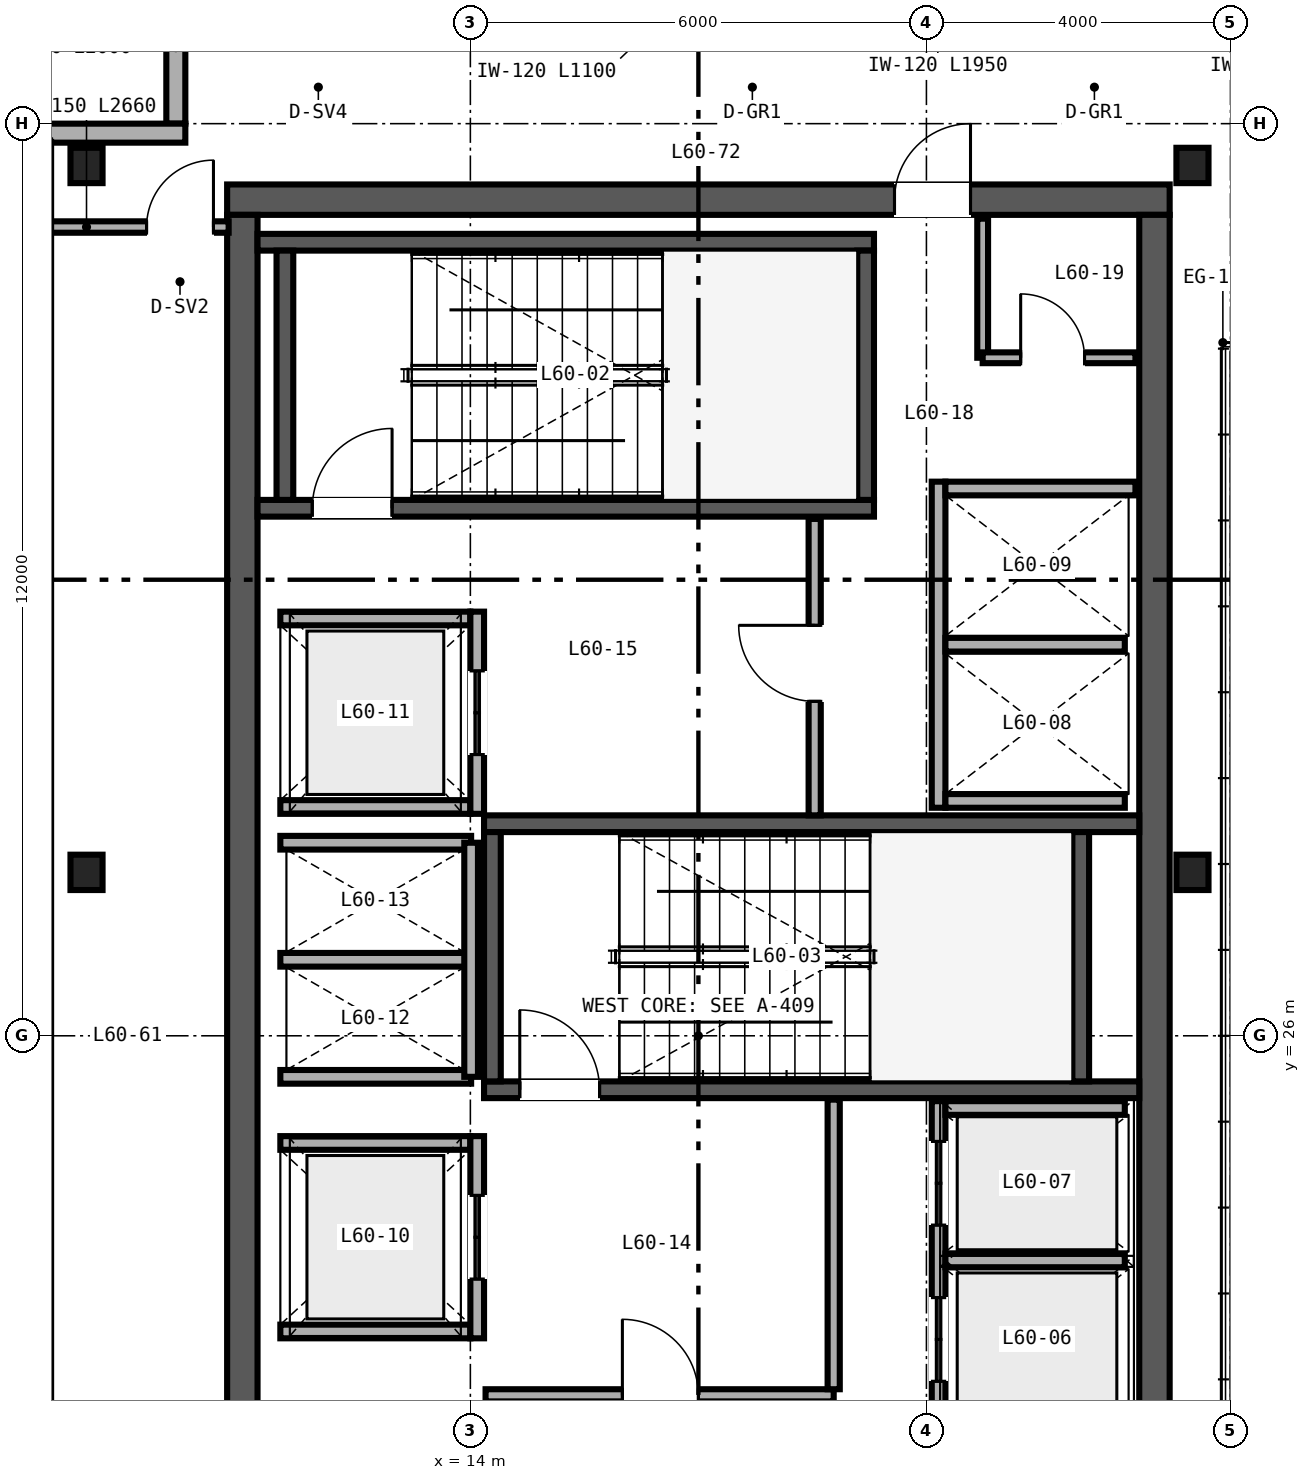
"""IFC4 building model, lengths in metres.
Left out: names, types, materials, properties, quantities, classifications, styles, units other than length and angle.
Written with IfcOpenShell. Run it as: python <this file> out.ifc"""

import sys

from ifc_helpers import new_model, si_unit, direction, frame, frame_2d, origin, origin_2d, place, context, subcontext, project, spatial, rectangle, i_section, extrude, source, transform, mapped, element, fill, save


model = new_model("IFC4")
c1 = context("Model", 3, precision=1e-05, world=origin(), true_north=direction((0.0, 1.0)))
c2 = subcontext(c1, "Body", "Model", "MODEL_VIEW")
j1 = project(units=[si_unit("LENGTHUNIT", "METRE"), si_unit("PLANEANGLEUNIT", "RADIAN")], contexts=[c1])
p1 = place(None, origin())
s1 = spatial("IfcSite", under=j1, at=p1, CompositionType="ELEMENT")
p2 = place(p1, origin())
s2 = spatial("IfcBuilding", under=s1, at=p2, CompositionType="ELEMENT")
p3 = place(p2, frame((0.0, 0.0, 240.0)))
s3 = spatial("IfcBuildingStorey", under=s2, at=p3, CompositionType="ELEMENT", Elevation=240.0)
p4 = place(p3, frame((10.8, 37.0, 0.0), z_axis=(0.0, 0.0, 1.0), x_axis=(1.0, 0.0, 0.0)))
e1 = element("IfcWall", 1, at=p4, inside=s3, PredefinedType="SHEAR", context=c2, shape_type="SweptSolid", body=[
    extrude(rectangle(XDim=12.4, YDim=0.4, at=frame_2d((6.2, 0.0))), origin(), (0.0, 0.0, 1.0), 3.38),
])
p5 = place(p4, frame((8.78, 0.0, 0.0)))
e2 = element("IfcOpeningElement", 2, at=p5, cuts=e1, PredefinedType="OPENING", context=c2, shape_type="SweptSolid", body=[
    extrude(rectangle(XDim=1.0, YDim=2.15, at=frame_2d((0.5, 1.075))), frame((0.0, 0.21, 0.0), z_axis=(0.0, -1.0, 0.0), x_axis=(1.0, 0.0, 0.0)), (0.0, 0.0, 1.0), 0.42),
])
for number, where, z_axis, x_axis in (
    (3, (11.0, 15.2, 0.0), (0.0, 0.0, 1.0), (0.0, 1.0, 0.0)),
    (4, (23.0, 15.2, 0.0), (0.0, 0.0, 1.0), (0.0, 1.0, 0.0)),
):
    element("IfcWall", number, at=place(p3, frame(where, z_axis=z_axis, x_axis=x_axis)), inside=s3, PredefinedType="SHEAR", context=c2, shape_type="SweptSolid", body=[
        extrude(rectangle(XDim=21.6, YDim=0.4, at=frame_2d((10.8, 0.0))), origin(), (0.0, 0.0, 1.0), 3.38),
    ])
p6 = place(p3, frame((11.2, 32.94, 0.0), z_axis=(0.0, 0.0, 1.0), x_axis=(1.0, 0.0, 0.0)))
e5 = element("IfcWall", 5, at=p6, inside=s3, PredefinedType="SHEAR", context=c2, shape_type="SweptSolid", body=[
    extrude(rectangle(XDim=8.11, YDim=0.22, at=frame_2d((4.055, 0.0))), origin(), (0.0, 0.0, 1.0), 3.4),
])
p7 = place(p6, frame((0.72, 0.0, 0.0)))
e6 = element("IfcOpeningElement", 6, at=p7, cuts=e5, PredefinedType="OPENING", context=c2, shape_type="SweptSolid", body=[
    extrude(rectangle(XDim=1.05, YDim=2.15, at=frame_2d((0.525, 1.075))), frame((0.0, 0.12, 0.0), z_axis=(0.0, -1.0, 0.0), x_axis=(1.0, 0.0, 0.0)), (0.0, 0.0, 1.0), 0.24),
])
p8 = place(p3, frame((11.2, 36.44, 0.0), z_axis=(0.0, 0.0, 1.0), x_axis=(1.0, 0.0, 0.0)))
e7 = element("IfcWall", 7, at=p8, inside=s3, PredefinedType="SHEAR", context=c2, shape_type="SweptSolid", body=[
    extrude(rectangle(XDim=8.11, YDim=0.22, at=frame_2d((4.055, 0.0))), origin(), (0.0, 0.0, 1.0), 3.4),
])
for number, where, z_axis, x_axis in (
    (8, (11.56, 33.05, 0.0), (0.0, 0.0, 1.0), (0.0, 1.0, 0.0)),
    (9, (19.2, 33.05, 0.0), (0.0, 0.0, 1.0), (0.0, 1.0, 0.0)),
):
    element("IfcWall", number, at=place(p3, frame(where, z_axis=z_axis, x_axis=x_axis)), inside=s3, PredefinedType="SHEAR", context=c2, shape_type="SweptSolid", body=[
        extrude(rectangle(XDim=3.28, YDim=0.22, at=frame_2d((1.64, 0.0))), origin(), (0.0, 0.0, 1.0), 3.4),
    ])
p9 = place(p3, frame((14.18, 25.29, 0.0), z_axis=(0.0, 0.0, 1.0), x_axis=(1.0, 0.0, 0.0)))
e10 = element("IfcWall", 10, at=p9, inside=s3, PredefinedType="SHEAR", context=c2, shape_type="SweptSolid", body=[
    extrude(rectangle(XDim=8.62, YDim=0.22, at=frame_2d((4.31, 0.0))), origin(), (0.0, 0.0, 1.0), 3.4),
])
p10 = place(p9, frame((0.47, 0.0, 0.0)))
e11 = element("IfcOpeningElement", 11, at=p10, cuts=e10, PredefinedType="OPENING", context=c2, shape_type="SweptSolid", body=[
    extrude(rectangle(XDim=1.05, YDim=2.15, at=frame_2d((0.525, 1.075))), frame((0.0, 0.12, 0.0), z_axis=(0.0, -1.0, 0.0), x_axis=(1.0, 0.0, 0.0)), (0.0, 0.0, 1.0), 0.24),
])
p11 = place(p3, frame((14.18, 28.79, 0.0), z_axis=(0.0, 0.0, 1.0), x_axis=(1.0, 0.0, 0.0)))
e12 = element("IfcWall", 12, at=p11, inside=s3, PredefinedType="SHEAR", context=c2, shape_type="SweptSolid", body=[
    extrude(rectangle(XDim=8.62, YDim=0.22, at=frame_2d((4.31, 0.0))), origin(), (0.0, 0.0, 1.0), 3.4),
])
for number, where, z_axis, x_axis in (
    (13, (14.29, 25.4, 0.0), (0.0, 0.0, 1.0), (0.0, 1.0, 0.0)),
    (14, (22.03, 25.4, 0.0), (0.0, 0.0, 1.0), (0.0, 1.0, 0.0)),
):
    element("IfcWall", number, at=place(p3, frame(where, z_axis=z_axis, x_axis=x_axis)), inside=s3, PredefinedType="SHEAR", context=c2, shape_type="SweptSolid", body=[
        extrude(rectangle(XDim=3.28, YDim=0.22, at=frame_2d((1.64, 0.0))), origin(), (0.0, 0.0, 1.0), 3.4),
    ])
m1 = source(origin(), c2, "Body", "SweptSolid", [
    extrude(i_section(OverallWidth=0.422, OverallDepth=0.465, WebThickness=0.045, FlangeThickness=0.073, FilletRadius=0.025, at=origin_2d()), origin(), (0.0, 0.0, 1.0), 3.38),
])
for number, where, z_axis, x_axis in (
    (15, (8.95, 28.15, 0.0), (0.0, 0.0, 1.0), (1.0, 0.0, 0.0)),
    (16, (23.5, 28.15, 0.0), (0.0, 0.0, 1.0), (1.0, 0.0, 0.0)),
    (17, (8.95, 37.45, 0.0), (0.0, 0.0, 1.0), (1.0, 0.0, 0.0)),
    (18, (23.5, 37.45, 0.0), (0.0, 0.0, 1.0), (1.0, 0.0, 0.0)),
):
    element("IfcColumn", number, at=place(p3, frame(where, z_axis=z_axis, x_axis=x_axis)), inside=s3, PredefinedType="COLUMN", context=c2, shape_type="MappedRepresentation", body=[
        mapped(m1, transform((0.0, 0.0, 0.0), scale=1.0)),
    ])
p12 = place(p3, frame((10.125, 40.0, 0.0), z_axis=(0.0, 0.0, 1.0), x_axis=(0.0, -1.0, 0.0)))
e19 = element("IfcWall", 19, at=p12, inside=s3, PredefinedType="SOLIDWALL", context=c2, shape_type="SweptSolid", body=[
    extrude(rectangle(XDim=2.0, YDim=0.25, at=frame_2d((1.0, 0.0))), origin(), (0.0, 0.0, 1.0), 3.38),
])
p13 = place(p3, frame((10.25, 37.875, 0.0), z_axis=(0.0, 0.0, 1.0), x_axis=(-1.0, 0.0, 0.0)))
e20 = element("IfcWall", 20, at=p13, inside=s3, PredefinedType="SOLIDWALL", context=c2, shape_type="SweptSolid", body=[
    extrude(rectangle(XDim=2.25, YDim=0.25, at=frame_2d((1.125, 0.0))), origin(), (0.0, 0.0, 1.0), 3.38),
])
p14 = place(p3, frame((20.16, 18.82, 0.0), z_axis=(0.0, 0.0, 1.0), x_axis=(0.0, 1.0, 0.0)))
e21 = element("IfcWall", 21, at=p14, inside=s3, PredefinedType="SOLIDWALL", context=c2, shape_type="SweptSolid", body=[
    extrude(rectangle(XDim=6.32, YDim=0.18, at=frame_2d((3.16, 0.0))), origin(), (0.0, 0.0, 1.0), 2.48),
])
p15 = place(p14, frame((0.555, 0.0, 0.0)))
e22 = element("IfcOpeningElement", 22, at=p15, cuts=e21, PredefinedType="OPENING", context=c2, shape_type="SweptSolid", body=[
    extrude(rectangle(XDim=1.1, YDim=2.2, at=frame_2d((0.55, 1.1))), frame((0.0, 0.1, 0.0), z_axis=(0.0, -1.0, 0.0), x_axis=(1.0, 0.0, 0.0)), (0.0, 0.0, 1.0), 0.2),
])
p16 = place(p14, frame((2.635, 0.0, 0.0)))
e23 = element("IfcOpeningElement", 23, at=p16, cuts=e21, PredefinedType="OPENING", context=c2, shape_type="SweptSolid", body=[
    extrude(rectangle(XDim=1.1, YDim=2.2, at=frame_2d((0.55, 1.1))), frame((0.0, 0.1, 0.0), z_axis=(0.0, -1.0, 0.0), x_axis=(1.0, 0.0, 0.0)), (0.0, 0.0, 1.0), 0.2),
])
p17 = place(p14, frame((4.69, 0.0, 0.0)))
e24 = element("IfcOpeningElement", 24, at=p17, cuts=e21, PredefinedType="OPENING", context=c2, shape_type="SweptSolid", body=[
    extrude(rectangle(XDim=1.1, YDim=2.2, at=frame_2d((0.55, 1.1))), frame((0.0, 0.1, 0.0), z_axis=(0.0, -1.0, 0.0), x_axis=(1.0, 0.0, 0.0)), (0.0, 0.0, 1.0), 0.2),
])
for number, where, z_axis, x_axis in (
    (25, (20.25, 25.05, 0.0), (0.0, 0.0, 1.0), (1.0, 0.0, 0.0)),
    (26, (20.25, 23.045, 0.0), (0.0, 0.0, 1.0), (1.0, 0.0, 0.0)),
):
    element("IfcWall", number, at=place(p3, frame(where, z_axis=z_axis, x_axis=x_axis)), inside=s3, PredefinedType="SOLIDWALL", context=c2, shape_type="SweptSolid", body=[
        extrude(rectangle(XDim=2.36, YDim=0.18, at=frame_2d((1.18, 0.0))), origin(), (0.0, 0.0, 1.0), 3.38),
    ])
p18 = place(p3, frame((20.16, 29.0, 0.0), z_axis=(0.0, 0.0, 1.0), x_axis=(0.0, 1.0, 0.0)))
e27 = element("IfcWall", 27, at=p18, inside=s3, PredefinedType="SOLIDWALL", context=c2, shape_type="SweptSolid", body=[
    extrude(rectangle(XDim=4.29, YDim=0.18, at=frame_2d((2.145, 0.0))), origin(), (0.0, 0.0, 1.0), 3.38),
])
p19 = place(p3, frame((20.25, 29.09, 0.0), z_axis=(0.0, 0.0, 1.0), x_axis=(1.0, 0.0, 0.0)))
e28 = element("IfcWall", 28, at=p19, inside=s3, PredefinedType="SOLIDWALL", context=c2, shape_type="SweptSolid", body=[
    extrude(rectangle(XDim=2.36, YDim=0.18, at=frame_2d((1.18, 0.0))), origin(), (0.0, 0.0, 1.0), 3.38),
])
p20 = place(p3, frame((20.25, 33.2, 0.0), z_axis=(0.0, 0.0, 1.0), x_axis=(1.0, 0.0, 0.0)))
e29 = element("IfcWall", 29, at=p20, inside=s3, PredefinedType="SOLIDWALL", context=c2, shape_type="SweptSolid", body=[
    extrude(rectangle(XDim=2.5, YDim=0.18, at=frame_2d((1.25, 0.0))), origin(), (0.0, 0.0, 1.0), 3.38),
])
p21 = place(p3, frame((20.25, 31.145, 0.0), z_axis=(0.0, 0.0, 1.0), x_axis=(1.0, 0.0, 0.0)))
e30 = element("IfcWall", 30, at=p21, inside=s3, PredefinedType="SOLIDWALL", context=c2, shape_type="SweptSolid", body=[
    extrude(rectangle(XDim=2.36, YDim=0.18, at=frame_2d((1.18, 0.0))), origin(), (0.0, 0.0, 1.0), 3.38),
])
for number, where, z_axis, x_axis in (
    (31, (11.5, 22.11, 0.0), (0.0, 0.0, 1.0), (1.0, 0.0, 0.0)),
    (32, (11.5, 24.59, 0.0), (0.0, 0.0, 1.0), (1.0, 0.0, 0.0)),
):
    element("IfcWall", number, at=place(p3, frame(where, z_axis=z_axis, x_axis=x_axis)), inside=s3, PredefinedType="SOLIDWALL", context=c2, shape_type="SweptSolid", body=[
        extrude(rectangle(XDim=2.5, YDim=0.18, at=frame_2d((1.25, 0.0))), origin(), (0.0, 0.0, 1.0), 3.38),
    ])
p22 = place(p3, frame((14.09, 22.02, 0.0), z_axis=(0.0, 0.0, 1.0), x_axis=(0.0, 1.0, 0.0)))
e33 = element("IfcWall", 33, at=p22, inside=s3, PredefinedType="SOLIDWALL", context=c2, shape_type="SweptSolid", body=[
    extrude(rectangle(XDim=2.66, YDim=0.18, at=frame_2d((1.33, 0.0))), origin(), (0.0, 0.0, 1.0), 3.38),
])
p23 = place(p22, frame((0.78, 0.0, 0.0)))
e34 = element("IfcOpeningElement", 34, at=p23, cuts=e33, PredefinedType="OPENING", context=c2, shape_type="SweptSolid", body=[
    extrude(rectangle(XDim=1.1, YDim=2.2, at=frame_2d((0.55, 1.1))), frame((0.0, 0.1, 0.0), z_axis=(0.0, -1.0, 0.0), x_axis=(1.0, 0.0, 0.0)), (0.0, 0.0, 1.0), 0.2),
])
for number, where, z_axis, x_axis in (
    (35, (11.5, 29.01, 0.0), (0.0, 0.0, 1.0), (1.0, 0.0, 0.0)),
    (36, (11.5, 31.49, 0.0), (0.0, 0.0, 1.0), (1.0, 0.0, 0.0)),
):
    element("IfcWall", number, at=place(p3, frame(where, z_axis=z_axis, x_axis=x_axis)), inside=s3, PredefinedType="SOLIDWALL", context=c2, shape_type="SweptSolid", body=[
        extrude(rectangle(XDim=2.5, YDim=0.18, at=frame_2d((1.25, 0.0))), origin(), (0.0, 0.0, 1.0), 3.38),
    ])
p24 = place(p3, frame((14.09, 28.92, 0.0), z_axis=(0.0, 0.0, 1.0), x_axis=(0.0, 1.0, 0.0)))
e37 = element("IfcWall", 37, at=p24, inside=s3, PredefinedType="SOLIDWALL", context=c2, shape_type="SweptSolid", body=[
    extrude(rectangle(XDim=2.66, YDim=0.18, at=frame_2d((1.33, 0.0))), origin(), (0.0, 0.0, 1.0), 3.38),
])
p25 = place(p24, frame((0.78, 0.0, 0.0)))
e38 = element("IfcOpeningElement", 38, at=p25, cuts=e37, PredefinedType="OPENING", context=c2, shape_type="SweptSolid", body=[
    extrude(rectangle(XDim=1.1, YDim=2.2, at=frame_2d((0.55, 1.1))), frame((0.0, 0.1, 0.0), z_axis=(0.0, -1.0, 0.0), x_axis=(1.0, 0.0, 0.0)), (0.0, 0.0, 1.0), 0.2),
])
for number, where, z_axis, x_axis in (
    (39, (11.5, 25.46, 0.0), (0.0, 0.0, 1.0), (1.0, 0.0, 0.0)),
    (40, (11.5, 27.0, 0.0), (0.0, 0.0, 1.0), (1.0, 0.0, 0.0)),
    (41, (11.5, 28.54, 0.0), (0.0, 0.0, 1.0), (1.0, 0.0, 0.0)),
):
    element("IfcWall", number, at=place(p3, frame(where, z_axis=z_axis, x_axis=x_axis)), inside=s3, PredefinedType="SOLIDWALL", context=c2, shape_type="SweptSolid", body=[
        extrude(rectangle(XDim=2.51, YDim=0.18, at=frame_2d((1.255, 0.0))), origin(), (0.0, 0.0, 1.0), 3.38),
    ])
p26 = place(p3, frame((14.01, 25.46, 0.0), z_axis=(0.0, 0.0, 1.0), x_axis=(0.0, 1.0, 0.0)))
e42 = element("IfcWall", 42, at=p26, inside=s3, PredefinedType="SOLIDWALL", context=c2, shape_type="SweptSolid", body=[
    extrude(rectangle(XDim=3.08, YDim=0.18, at=frame_2d((1.54, 0.0))), origin(), (0.0, 0.0, 1.0), 3.38),
])
p27 = place(p3, frame((14.2, 21.27, 0.0), z_axis=(0.0, 0.0, 1.0), x_axis=(1.0, 0.0, 0.0)))
e43 = element("IfcWall", 43, at=p27, inside=s3, PredefinedType="PARTITIONING", context=c2, shape_type="SweptSolid", body=[
    extrude(rectangle(XDim=4.58, YDim=0.16, at=frame_2d((2.29, 0.0))), origin(), (0.0, 0.0, 1.0), 3.38),
])
p28 = place(p27, frame((1.8, 0.0, 0.0)))
e44 = element("IfcOpeningElement", 44, at=p28, cuts=e43, PredefinedType="OPENING", context=c2, shape_type="SweptSolid", body=[
    extrude(rectangle(XDim=1.0, YDim=2.15, at=frame_2d((0.5, 1.075))), frame((0.0, 0.09, 0.0), z_axis=(0.0, -1.0, 0.0), x_axis=(1.0, 0.0, 0.0)), (0.0, 0.0, 1.0), 0.18),
])
p29 = place(p3, frame((18.78, 21.35, 0.0), z_axis=(0.0, 0.0, 1.0), x_axis=(0.0, 1.0, 0.0)))
e45 = element("IfcWall", 45, at=p29, inside=s3, PredefinedType="PARTITIONING", context=c2, shape_type="SweptSolid", body=[
    extrude(rectangle(XDim=3.81, YDim=0.16, at=frame_2d((1.905, 0.0))), origin(), (0.0, 0.0, 1.0), 3.38),
])
p30 = place(p3, frame((18.53, 28.9, 0.0), z_axis=(0.0, 0.0, 1.0), x_axis=(0.0, 1.0, 0.0)))
e46 = element("IfcWall", 46, at=p30, inside=s3, PredefinedType="PARTITIONING", context=c2, shape_type="SweptSolid", body=[
    extrude(rectangle(XDim=3.9, YDim=0.16, at=frame_2d((1.95, 0.0))), origin(), (0.0, 0.0, 1.0), 3.38),
])
p31 = place(p30, frame((1.5, 0.0, 0.0)))
e47 = element("IfcOpeningElement", 47, at=p31, cuts=e46, PredefinedType="OPENING", context=c2, shape_type="SweptSolid", body=[
    extrude(rectangle(XDim=1.0, YDim=2.15, at=frame_2d((0.5, 1.075))), frame((0.0, 0.09, 0.0), z_axis=(0.0, -1.0, 0.0), x_axis=(1.0, 0.0, 0.0)), (0.0, 0.0, 1.0), 0.18),
])
p32 = place(p3, frame((20.74, 34.92, 0.0), z_axis=(0.0, 0.0, 1.0), x_axis=(0.0, 1.0, 0.0)))
e48 = element("IfcWall", 48, at=p32, inside=s3, PredefinedType="PARTITIONING", context=c2, shape_type="SweptSolid", body=[
    extrude(rectangle(XDim=1.83, YDim=0.142, at=frame_2d((0.915, 0.0))), origin(), (0.0, 0.0, 1.0), 3.38),
])
p33 = place(p3, frame((20.74, 34.92, 0.0), z_axis=(0.0, 0.0, 1.0), x_axis=(1.0, 0.0, 0.0)))
e49 = element("IfcWall", 49, at=p33, inside=s3, PredefinedType="PARTITIONING", context=c2, shape_type="SweptSolid", body=[
    extrude(rectangle(XDim=2.01, YDim=0.142, at=frame_2d((1.005, 0.0))), origin(), (0.0, 0.0, 1.0), 3.38),
])
p34 = place(p33, frame((0.5, 0.0, 0.0)))
e50 = element("IfcOpeningElement", 50, at=p34, cuts=e49, PredefinedType="OPENING", context=c2, shape_type="SweptSolid", body=[
    extrude(rectangle(XDim=0.84, YDim=2.1, at=frame_2d((0.42, 1.05))), frame((0.0, 0.081, 0.0), z_axis=(0.0, -1.0, 0.0), x_axis=(1.0, 0.0, 0.0)), (0.0, 0.0, 1.0), 0.162),
])
p35 = place(p3, frame((8.16, 36.64, 0.0), z_axis=(0.0, 0.0, 1.0), x_axis=(1.0, 0.0, 0.0)))
e51 = element("IfcWall", 51, at=p35, inside=s3, PredefinedType="PARTITIONING", context=c2, shape_type="SweptSolid", body=[
    extrude(rectangle(XDim=2.66, YDim=0.15, at=frame_2d((1.33, 0.0))), origin(), (0.0, 0.0, 1.0), 2.763),
])
p36 = place(p35, frame((1.58, 0.0, 0.0)))
e52 = element("IfcOpeningElement", 52, at=p36, cuts=e51, PredefinedType="OPENING", context=c2, shape_type="SweptSolid", body=[
    extrude(rectangle(XDim=0.88, YDim=2.15, at=frame_2d((0.44, 1.075))), frame((0.0, 0.085, 0.0), z_axis=(0.0, -1.0, 0.0), x_axis=(1.0, 0.0, 0.0)), (0.0, 0.0, 1.0), 0.17),
])
m2 = source(origin(), c2, "Body", "SweptSolid", [
    extrude(rectangle(XDim=1.05, YDim=2.15, at=frame_2d((0.525, 1.075))), frame((0.0, 0.025, 0.0), z_axis=(0.0, -1.0, 0.0), x_axis=(1.0, 0.0, 0.0)), (0.0, 0.0, 1.0), 0.05),
])
p37 = place(p7, origin())
e53 = element("IfcDoor", 53, at=p37, inside=s3, OperationType="SINGLE_SWING_RIGHT", PredefinedType="DOOR", context=c2, shape_type="MappedRepresentation", body=[
    mapped(m2, transform((0.0, 0.0, 0.0), scale=1.0)),
])
fill(e6, e53)
p38 = place(p10, origin())
e54 = element("IfcDoor", 54, at=p38, inside=s3, OperationType="SINGLE_SWING_LEFT", PredefinedType="DOOR", context=c2, shape_type="MappedRepresentation", body=[
    mapped(m2, transform((0.0, 0.0, 0.0), scale=1.0)),
])
fill(e11, e54)
m3 = source(origin(), c2, "Body", "SweptSolid", [
    extrude(rectangle(XDim=1.1, YDim=2.2, at=frame_2d((0.55, 1.1))), frame((0.0, 0.025, 0.0), z_axis=(0.0, -1.0, 0.0), x_axis=(1.0, 0.0, 0.0)), (0.0, 0.0, 1.0), 0.05),
])
p39 = place(p16, origin())
e55 = element("IfcDoor", 55, at=p39, inside=s3, OperationType="DOUBLE_DOOR_SLIDING", PredefinedType="DOOR", context=c2, shape_type="MappedRepresentation", body=[
    mapped(m3, transform((0.0, 0.0, 0.0), scale=1.0)),
])
fill(e23, e55)
p40 = place(p17, origin())
e56 = element("IfcDoor", 56, at=p40, inside=s3, OperationType="DOUBLE_DOOR_SLIDING", PredefinedType="DOOR", context=c2, shape_type="MappedRepresentation", body=[
    mapped(m3, transform((0.0, 0.0, 0.0), scale=1.0)),
])
fill(e24, e56)
p41 = place(p23, origin())
e57 = element("IfcDoor", 57, at=p41, inside=s3, OperationType="DOUBLE_DOOR_SLIDING", PredefinedType="DOOR", context=c2, shape_type="MappedRepresentation", body=[
    mapped(m3, transform((0.0, 0.0, 0.0), scale=1.0)),
])
fill(e34, e57)
p42 = place(p25, origin())
e58 = element("IfcDoor", 58, at=p42, inside=s3, OperationType="DOUBLE_DOOR_SLIDING", PredefinedType="DOOR", context=c2, shape_type="MappedRepresentation", body=[
    mapped(m3, transform((0.0, 0.0, 0.0), scale=1.0)),
])
fill(e38, e58)
m4 = source(origin(), c2, "Body", "SweptSolid", [
    extrude(rectangle(XDim=1.0, YDim=2.15, at=frame_2d((0.5, 1.075))), frame((0.0, 0.025, 0.0), z_axis=(0.0, -1.0, 0.0), x_axis=(1.0, 0.0, 0.0)), (0.0, 0.0, 1.0), 0.05),
])
p43 = place(p28, origin())
e59 = element("IfcDoor", 59, at=p43, inside=s3, OperationType="SINGLE_SWING_LEFT", PredefinedType="DOOR", context=c2, shape_type="MappedRepresentation", body=[
    mapped(m4, transform((0.0, 0.0, 0.0), scale=1.0)),
])
fill(e44, e59)
p44 = place(p31, origin())
e60 = element("IfcDoor", 60, at=p44, inside=s3, OperationType="SINGLE_SWING_RIGHT", PredefinedType="DOOR", context=c2, shape_type="MappedRepresentation", body=[
    mapped(m4, transform((0.0, 0.0, 0.0), scale=1.0)),
])
fill(e47, e60)
m5 = source(origin(), c2, "Body", "SweptSolid", [
    extrude(rectangle(XDim=0.84, YDim=2.1, at=frame_2d((0.42, 1.05))), frame((0.0, 0.025, 0.0), z_axis=(0.0, -1.0, 0.0), x_axis=(1.0, 0.0, 0.0)), (0.0, 0.0, 1.0), 0.05),
])
p45 = place(p34, origin())
e61 = element("IfcDoor", 61, at=p45, inside=s3, OperationType="SINGLE_SWING_LEFT", PredefinedType="DOOR", context=c2, shape_type="MappedRepresentation", body=[
    mapped(m5, transform((0.0, 0.0, 0.0), scale=1.0)),
])
fill(e50, e61)
p46 = place(p5, origin())
e62 = element("IfcDoor", 62, at=p46, inside=s3, OperationType="SINGLE_SWING_RIGHT", PredefinedType="DOOR", context=c2, shape_type="MappedRepresentation", body=[
    mapped(m4, transform((0.0, 0.0, 0.0), scale=1.0)),
])
fill(e2, e62)
m6 = source(origin(), c2, "Body", "SweptSolid", [
    extrude(rectangle(XDim=0.88, YDim=2.15, at=frame_2d((0.44, 1.075))), frame((0.0, 0.025, 0.0), z_axis=(0.0, -1.0, 0.0), x_axis=(1.0, 0.0, 0.0)), (0.0, 0.0, 1.0), 0.05),
])
p47 = place(p36, origin())
e63 = element("IfcDoor", 63, at=p47, inside=s3, OperationType="SINGLE_SWING_RIGHT", PredefinedType="DOOR", context=c2, shape_type="MappedRepresentation", body=[
    mapped(m6, transform((0.0, 0.0, 0.0), scale=1.0)),
])
fill(e52, e63)
save(model, sys.argv[1])
